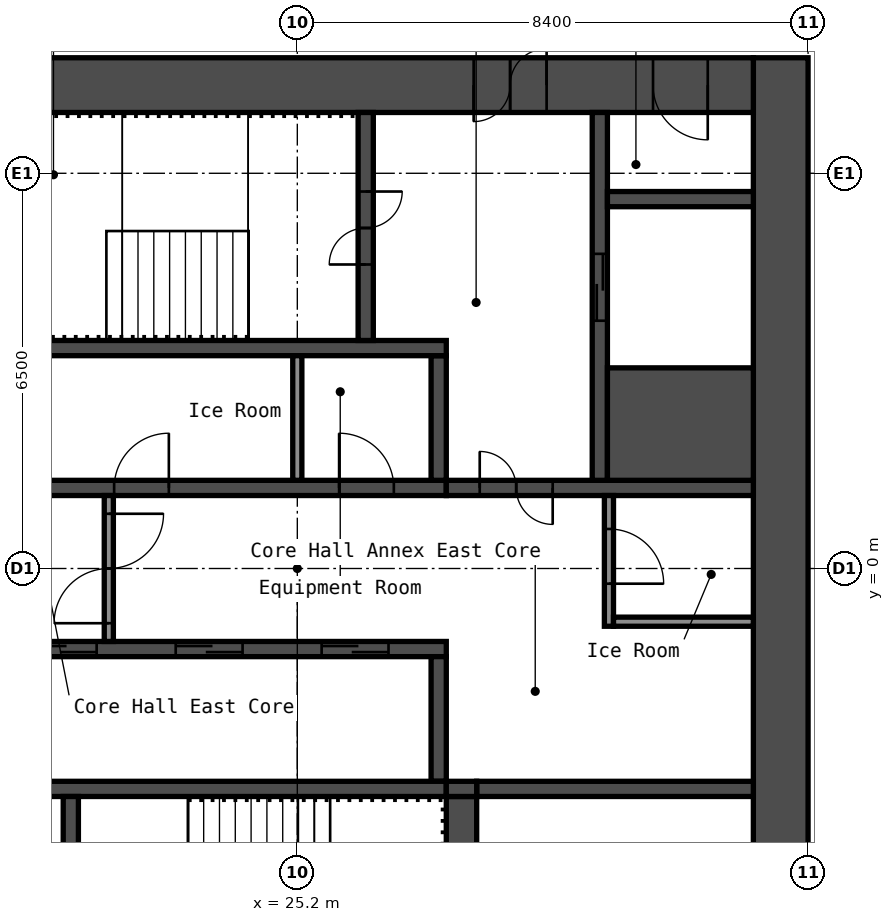
"""IFC4 building model, lengths in metres.
Left out: names, types, materials, properties, quantities, classifications, styles, units other than length and angle.
Written with IfcOpenShell. Run it as: python <this file> out.ifc"""

import sys

from ifc_helpers import new_model, si_unit, direction, frame, frame_2d, origin, place, context, subcontext, project, spatial, rectangle, extrude, element, fill, save


model = new_model("IFC4")
c1 = context("Model", 3, precision=1e-05, world=origin(), true_north=direction((0.0, 1.0)))
c2 = subcontext(c1, "Body", "Model", "MODEL_VIEW")
j1 = project(units=[si_unit("LENGTHUNIT", "METRE"), si_unit("PLANEANGLEUNIT", "RADIAN")], contexts=[c1])
p1 = place(None, origin())
s1 = spatial("IfcSite", under=j1, at=p1, CompositionType="ELEMENT")
p2 = place(p1, origin())
s2 = spatial("IfcBuilding", under=s1, at=p2, CompositionType="ELEMENT")
p3 = place(p2, frame((0.0, 0.0, 239.0)))
s3 = spatial("IfcBuildingStorey", under=s2, at=p3, CompositionType="ELEMENT", Elevation=239.0)
p4 = place(p3, frame((33.15, -8.4, 0.0), z_axis=(0.0, 0.0, 1.0), x_axis=(0.0, 1.0, 0.0)))
e1 = element("IfcWall", 1, at=p4, inside=s3, PredefinedType="SHEAR", context=c2, shape_type="SweptSolid", body=[
    extrude(rectangle(XDim=16.8, YDim=0.9, at=frame_2d((8.4, 0.0))), origin(), (0.0, 0.0, 1.0), 2.75),
])
p5 = place(p3, frame((17.7, 7.95, 0.0), z_axis=(0.0, 0.0, 1.0), x_axis=(1.0, 0.0, 0.0)))
e2 = element("IfcWall", 2, at=p5, inside=s3, PredefinedType="SHEAR", context=c2, shape_type="SweptSolid", body=[
    extrude(rectangle(XDim=15.0, YDim=0.9, at=frame_2d((7.5, 0.0))), origin(), (0.0, 0.0, 1.0), 2.75),
])
p6 = place(p5, frame((10.4, 0.0, 0.0)))
e3 = element("IfcOpeningElement", 3, at=p6, cuts=e2, PredefinedType="OPENING", context=c2, shape_type="SweptSolid", body=[
    extrude(rectangle(XDim=1.2, YDim=2.1, at=frame_2d((0.6, 1.05))), frame((0.0, 0.46, 0.0), z_axis=(0.0, -1.0, 0.0), x_axis=(1.0, 0.0, 0.0)), (0.0, 0.0, 1.0), 0.92),
])
p7 = place(p5, frame((13.35, 0.0, 0.0)))
e4 = element("IfcOpeningElement", 4, at=p7, cuts=e2, PredefinedType="OPENING", context=c2, shape_type="SweptSolid", body=[
    extrude(rectangle(XDim=0.9, YDim=2.1, at=frame_2d((0.45, 1.05))), frame((0.0, 0.46, 0.0), z_axis=(0.0, -1.0, 0.0), x_axis=(1.0, 0.0, 0.0)), (0.0, 0.0, 1.0), 0.92),
])
p8 = place(p3, frame((20.15, 1.325, 0.0), z_axis=(0.0, 0.0, 1.0), x_axis=(1.0, 0.0, 0.0)))
e5 = element("IfcWall", 5, at=p8, inside=s3, PredefinedType="SHEAR", context=c2, shape_type="SweptSolid", body=[
    extrude(rectangle(XDim=7.5, YDim=0.25, at=frame_2d((3.75, 0.0))), origin(), (0.0, 0.0, 1.0), 2.75),
])
p9 = place(p8, frame((2.038, 0.0, 0.0)))
e6 = element("IfcOpeningElement", 6, at=p9, cuts=e5, PredefinedType="OPENING", context=c2, shape_type="SweptSolid", body=[
    extrude(rectangle(XDim=0.9, YDim=2.1, at=frame_2d((0.45, 1.05))), frame((0.0, 0.135, 0.0), z_axis=(0.0, -1.0, 0.0), x_axis=(1.0, 0.0, 0.0)), (0.0, 0.0, 1.0), 0.27),
])
p10 = place(p8, frame((5.738, 0.0, 0.0)))
e7 = element("IfcOpeningElement", 7, at=p10, cuts=e5, PredefinedType="OPENING", context=c2, shape_type="SweptSolid", body=[
    extrude(rectangle(XDim=0.9, YDim=2.1, at=frame_2d((0.45, 1.05))), frame((0.0, 0.135, 0.0), z_axis=(0.0, -1.0, 0.0), x_axis=(1.0, 0.0, 0.0)), (0.0, 0.0, 1.0), 0.27),
])
p11 = place(p3, frame((27.525, 1.45, 0.0), z_axis=(0.0, 0.0, 1.0), x_axis=(0.0, 1.0, 0.0)))
e8 = element("IfcWall", 8, at=p11, inside=s3, PredefinedType="SHEAR", context=c2, shape_type="SweptSolid", body=[
    extrude(rectangle(XDim=2.05, YDim=0.25, at=frame_2d((1.025, 0.0))), origin(), (0.0, 0.0, 1.0), 2.75),
])
p12 = place(p3, frame((20.15, 3.625, 0.0), z_axis=(0.0, 0.0, 1.0), x_axis=(1.0, 0.0, 0.0)))
e9 = element("IfcWall", 9, at=p12, inside=s3, PredefinedType="SHEAR", context=c2, shape_type="SweptSolid", body=[
    extrude(rectangle(XDim=7.5, YDim=0.25, at=frame_2d((3.75, 0.0))), origin(), (0.0, 0.0, 1.0), 2.75),
])
p13 = place(p3, frame((26.325, 3.75, 0.0), z_axis=(0.0, 0.0, 1.0), x_axis=(0.0, 1.0, 0.0)))
e10 = element("IfcWall", 10, at=p13, inside=s3, PredefinedType="SHEAR", context=c2, shape_type="SweptSolid", body=[
    extrude(rectangle(XDim=3.75, YDim=0.25, at=frame_2d((1.875, 0.0))), origin(), (0.0, 0.0, 1.0), 2.75),
])
p14 = place(p13, frame((1.25, 0.0, 0.0)))
e11 = element("IfcOpeningElement", 11, at=p14, cuts=e10, PredefinedType="OPENING", context=c2, shape_type="SweptSolid", body=[
    extrude(rectangle(XDim=1.2, YDim=2.1, at=frame_2d((0.6, 1.05))), frame((0.0, 0.135, 0.0), z_axis=(0.0, -1.0, 0.0), x_axis=(1.0, 0.0, 0.0)), (0.0, 0.0, 1.0), 0.27),
])
p15 = place(p3, frame((27.65, 1.325, 0.0), z_axis=(0.0, 0.0, 1.0), x_axis=(1.0, 0.0, 0.0)))
e12 = element("IfcWall", 12, at=p15, inside=s3, PredefinedType="SHEAR", context=c2, shape_type="SweptSolid", body=[
    extrude(rectangle(XDim=5.05, YDim=0.25, at=frame_2d((2.525, 0.0))), origin(), (0.0, 0.0, 1.0), 2.75),
])
p16 = place(p15, frame((0.55, 0.0, 0.0)))
e13 = element("IfcOpeningElement", 13, at=p16, cuts=e12, PredefinedType="OPENING", context=c2, shape_type="SweptSolid", body=[
    extrude(rectangle(XDim=1.2, YDim=2.1, at=frame_2d((0.6, 1.05))), frame((0.0, 0.135, 0.0), z_axis=(0.0, -1.0, 0.0), x_axis=(1.0, 0.0, 0.0)), (0.0, 0.0, 1.0), 0.27),
])
p17 = place(p3, frame((30.175, 1.45, 0.0), z_axis=(0.0, 0.0, 1.0), x_axis=(0.0, 1.0, 0.0)))
e14 = element("IfcWall", 14, at=p17, inside=s3, PredefinedType="SHEAR", context=c2, shape_type="SweptSolid", body=[
    extrude(rectangle(XDim=6.05, YDim=0.25, at=frame_2d((3.025, 0.0))), origin(), (0.0, 0.0, 1.0), 2.75),
])
p18 = place(p17, frame((2.625, 0.0, 0.0)))
e15 = element("IfcOpeningElement", 15, at=p18, cuts=e14, PredefinedType="OPENING", context=c2, shape_type="SweptSolid", body=[
    extrude(rectangle(XDim=1.1, YDim=2.1, at=frame_2d((0.55, 1.05))), frame((0.0, 0.135, 0.0), z_axis=(0.0, -1.0, 0.0), x_axis=(1.0, 0.0, 0.0)), (0.0, 0.0, 1.0), 0.27),
])
p19 = place(p3, frame((30.3, 2.375, 0.0), z_axis=(0.0, 0.0, 1.0), x_axis=(1.0, 0.0, 0.0)))
e16 = element("IfcWall", 16, at=p19, inside=s3, PredefinedType="SHEAR", context=c2, shape_type="SweptSolid", body=[
    extrude(rectangle(XDim=2.4, YDim=1.85, at=frame_2d((1.2, 0.0))), origin(), (0.0, 0.0, 1.0), 2.75),
])
p20 = place(p3, frame((30.3, 6.075, 0.0), z_axis=(0.0, 0.0, 1.0), x_axis=(1.0, 0.0, 0.0)))
e17 = element("IfcWall", 17, at=p20, inside=s3, PredefinedType="SHEAR", context=c2, shape_type="SweptSolid", body=[
    extrude(rectangle(XDim=2.4, YDim=0.25, at=frame_2d((1.2, 0.0))), origin(), (0.0, 0.0, 1.0), 2.75),
])
p21 = place(p3, frame((20.15, -1.325, 0.0), z_axis=(0.0, 0.0, 1.0), x_axis=(1.0, 0.0, 0.0)))
e18 = element("IfcWall", 18, at=p21, inside=s3, PredefinedType="SHEAR", context=c2, shape_type="SweptSolid", body=[
    extrude(rectangle(XDim=7.5, YDim=0.25, at=frame_2d((3.75, 0.0))), origin(), (0.0, 0.0, 1.0), 2.75),
])
p22 = place(p21, frame((0.65, 0.0, 0.0)))
e19 = element("IfcOpeningElement", 19, at=p22, cuts=e18, PredefinedType="OPENING", context=c2, shape_type="SweptSolid", body=[
    extrude(rectangle(XDim=1.1, YDim=2.1, at=frame_2d((0.55, 1.05))), frame((0.0, 0.135, 0.0), z_axis=(0.0, -1.0, 0.0), x_axis=(1.0, 0.0, 0.0)), (0.0, 0.0, 1.0), 0.27),
])
p23 = place(p21, frame((3.05, 0.0, 0.0)))
e20 = element("IfcOpeningElement", 20, at=p23, cuts=e18, PredefinedType="OPENING", context=c2, shape_type="SweptSolid", body=[
    extrude(rectangle(XDim=1.1, YDim=2.1, at=frame_2d((0.55, 1.05))), frame((0.0, 0.135, 0.0), z_axis=(0.0, -1.0, 0.0), x_axis=(1.0, 0.0, 0.0)), (0.0, 0.0, 1.0), 0.27),
])
p24 = place(p21, frame((5.45, 0.0, 0.0)))
e21 = element("IfcOpeningElement", 21, at=p24, cuts=e18, PredefinedType="OPENING", context=c2, shape_type="SweptSolid", body=[
    extrude(rectangle(XDim=1.1, YDim=2.1, at=frame_2d((0.55, 1.05))), frame((0.0, 0.135, 0.0), z_axis=(0.0, -1.0, 0.0), x_axis=(1.0, 0.0, 0.0)), (0.0, 0.0, 1.0), 0.27),
])
p25 = place(p3, frame((27.525, -3.5, 0.0), z_axis=(0.0, 0.0, 1.0), x_axis=(0.0, 1.0, 0.0)))
e22 = element("IfcWall", 22, at=p25, inside=s3, PredefinedType="SHEAR", context=c2, shape_type="SweptSolid", body=[
    extrude(rectangle(XDim=2.05, YDim=0.25, at=frame_2d((1.025, 0.0))), origin(), (0.0, 0.0, 1.0), 2.75),
])
p26 = place(p3, frame((20.15, -3.625, 0.0), z_axis=(0.0, 0.0, 1.0), x_axis=(1.0, 0.0, 0.0)))
e23 = element("IfcWall", 23, at=p26, inside=s3, PredefinedType="SHEAR", context=c2, shape_type="SweptSolid", body=[
    extrude(rectangle(XDim=7.5, YDim=0.25, at=frame_2d((3.75, 0.0))), origin(), (0.0, 0.0, 1.0), 2.75),
])
p27 = place(p3, frame((21.475, -7.5, 0.0), z_axis=(0.0, 0.0, 1.0), x_axis=(0.0, 1.0, 0.0)))
e24 = element("IfcWall", 24, at=p27, inside=s3, PredefinedType="SHEAR", context=c2, shape_type="SweptSolid", body=[
    extrude(rectangle(XDim=3.75, YDim=0.25, at=frame_2d((1.875, 0.0))), origin(), (0.0, 0.0, 1.0), 2.75),
])
p28 = place(p27, frame((1.3, 0.0, 0.0)))
e25 = element("IfcOpeningElement", 25, at=p28, cuts=e24, PredefinedType="OPENING", context=c2, shape_type="SweptSolid", body=[
    extrude(rectangle(XDim=1.2, YDim=2.1, at=frame_2d((0.6, 1.05))), frame((0.0, 0.135, 0.0), z_axis=(0.0, -1.0, 0.0), x_axis=(1.0, 0.0, 0.0)), (0.0, 0.0, 1.0), 0.27),
])
p29 = place(p3, frame((27.9, -7.5, 0.0), z_axis=(0.0, 0.0, 1.0), x_axis=(0.0, 1.0, 0.0)))
e26 = element("IfcWall", 26, at=p29, inside=s3, PredefinedType="SHEAR", context=c2, shape_type="SweptSolid", body=[
    extrude(rectangle(XDim=3.75, YDim=0.5, at=frame_2d((1.875, 0.0))), origin(), (0.0, 0.0, 1.0), 2.75),
])
p30 = place(p3, frame((28.15, -3.625, 0.0), z_axis=(0.0, 0.0, 1.0), x_axis=(1.0, 0.0, 0.0)))
e27 = element("IfcWall", 27, at=p30, inside=s3, PredefinedType="SHEAR", context=c2, shape_type="SweptSolid", body=[
    extrude(rectangle(XDim=4.55, YDim=0.25, at=frame_2d((2.275, 0.0))), origin(), (0.0, 0.0, 1.0), 2.75),
])
p31 = place(p3, frame((27.65, -3.625, 0.0), z_axis=(0.0, 0.0, 1.0), x_axis=(1.0, 0.0, 0.0)))
e28 = element("IfcWall", 28, at=p31, inside=s3, PredefinedType="SHEAR", context=c2, shape_type="SweptSolid", body=[
    extrude(rectangle(XDim=0.5, YDim=0.25, at=frame_2d((0.25, 0.0))), origin(), (0.0, 0.0, 1.0), 2.75),
])
p32 = place(p3, frame((22.1, -1.2, 0.0), z_axis=(0.0, 0.0, 1.0), x_axis=(0.0, 1.0, 0.0)))
e29 = element("IfcWall", 29, at=p32, inside=s3, PredefinedType="PARTITIONING", context=c2, shape_type="SweptSolid", body=[
    extrude(rectangle(XDim=2.4, YDim=0.15, at=frame_2d((1.2, 0.0))), origin(), (0.0, 0.0, 1.0), 2.75),
])
p33 = place(p32, frame((0.3, 0.0, 0.0)))
e30 = element("IfcOpeningElement", 30, at=p33, cuts=e29, PredefinedType="OPENING", context=c2, shape_type="SweptSolid", body=[
    extrude(rectangle(XDim=1.8, YDim=2.1, at=frame_2d((0.9, 1.05))), frame((0.0, 0.085, 0.0), z_axis=(0.0, -1.0, 0.0), x_axis=(1.0, 0.0, 0.0)), (0.0, 0.0, 1.0), 0.17),
])
p34 = place(p3, frame((30.325, -0.95, 0.0), z_axis=(0.0, 0.0, 1.0), x_axis=(0.0, 1.0, 0.0)))
e31 = element("IfcWall", 31, at=p34, inside=s3, PredefinedType="PARTITIONING", context=c2, shape_type="SweptSolid", body=[
    extrude(rectangle(XDim=2.15, YDim=0.15, at=frame_2d((1.075, 0.0))), origin(), (0.0, 0.0, 1.0), 2.75),
])
p35 = place(p34, frame((0.7, 0.0, 0.0)))
e32 = element("IfcOpeningElement", 32, at=p35, cuts=e31, PredefinedType="OPENING", context=c2, shape_type="SweptSolid", body=[
    extrude(rectangle(XDim=0.9, YDim=2.1, at=frame_2d((0.45, 1.05))), frame((0.0, 0.085, 0.0), z_axis=(0.0, -1.0, 0.0), x_axis=(1.0, 0.0, 0.0)), (0.0, 0.0, 1.0), 0.17),
])
p36 = place(p3, frame((30.4, -0.875, 0.0), z_axis=(0.0, 0.0, 1.0), x_axis=(1.0, 0.0, 0.0)))
e33 = element("IfcWall", 33, at=p36, inside=s3, PredefinedType="PARTITIONING", context=c2, shape_type="SweptSolid", body=[
    extrude(rectangle(XDim=2.3, YDim=0.15, at=frame_2d((1.15, 0.0))), origin(), (0.0, 0.0, 1.0), 2.75),
])
p37 = place(p3, frame((25.2, 1.45, 0.0), z_axis=(0.0, 0.0, 1.0), x_axis=(0.0, 1.0, 0.0)))
e34 = element("IfcWall", 34, at=p37, inside=s3, PredefinedType="PARTITIONING", context=c2, shape_type="SweptSolid", body=[
    extrude(rectangle(XDim=2.05, YDim=0.15, at=frame_2d((1.025, 0.0))), origin(), (0.0, 0.0, 1.0), 2.75),
])
p38 = place(p6, origin())
e35 = element("IfcDoor", 35, at=p38, inside=s3, OperationType="DOUBLE_DOOR_SINGLE_SWING", PredefinedType="DOOR", context=c2, shape_type="SweptSolid", body=[
    extrude(rectangle(XDim=1.2, YDim=2.1, at=frame_2d((0.6, 1.05))), frame((0.0, 0.025, 0.0), z_axis=(0.0, -1.0, 0.0), x_axis=(1.0, 0.0, 0.0)), (0.0, 0.0, 1.0), 0.05),
])
fill(e3, e35)
p39 = place(p7, origin())
e36 = element("IfcDoor", 36, at=p39, inside=s3, OperationType="SINGLE_SWING_RIGHT", PredefinedType="DOOR", context=c2, shape_type="SweptSolid", body=[
    extrude(rectangle(XDim=0.9, YDim=2.1, at=frame_2d((0.45, 1.05))), frame((0.0, 0.025, 0.0), z_axis=(0.0, -1.0, 0.0), x_axis=(1.0, 0.0, 0.0)), (0.0, 0.0, 1.0), 0.05),
])
fill(e4, e36)
p40 = place(p14, origin())
e37 = element("IfcDoor", 37, at=p40, inside=s3, OperationType="DOUBLE_DOOR_SINGLE_SWING", PredefinedType="DOOR", context=c2, shape_type="SweptSolid", body=[
    extrude(rectangle(XDim=1.2, YDim=2.1, at=frame_2d((0.6, 1.05))), frame((0.0, 0.025, 0.0), z_axis=(0.0, -1.0, 0.0), x_axis=(1.0, 0.0, 0.0)), (0.0, 0.0, 1.0), 0.05),
])
fill(e11, e37)
p41 = place(p16, origin())
e38 = element("IfcDoor", 38, at=p41, inside=s3, OperationType="DOUBLE_DOOR_SINGLE_SWING", PredefinedType="DOOR", context=c2, shape_type="SweptSolid", body=[
    extrude(rectangle(XDim=1.2, YDim=2.1, at=frame_2d((0.6, 1.05))), frame((0.0, 0.025, 0.0), z_axis=(0.0, -1.0, 0.0), x_axis=(1.0, 0.0, 0.0)), (0.0, 0.0, 1.0), 0.05),
])
fill(e13, e38)
p42 = place(p33, origin())
e39 = element("IfcDoor", 39, at=p42, inside=s3, OperationType="DOUBLE_DOOR_SINGLE_SWING", PredefinedType="DOOR", context=c2, shape_type="SweptSolid", body=[
    extrude(rectangle(XDim=1.8, YDim=2.1, at=frame_2d((0.9, 1.05))), frame((0.0, 0.025, 0.0), z_axis=(0.0, -1.0, 0.0), x_axis=(1.0, 0.0, 0.0)), (0.0, 0.0, 1.0), 0.05),
])
fill(e30, e39)
p43 = place(p35, origin())
e40 = element("IfcDoor", 40, at=p43, inside=s3, OperationType="SINGLE_SWING_LEFT", PredefinedType="DOOR", context=c2, shape_type="SweptSolid", body=[
    extrude(rectangle(XDim=0.9, YDim=2.1, at=frame_2d((0.45, 1.05))), frame((0.0, 0.025, 0.0), z_axis=(0.0, -1.0, 0.0), x_axis=(1.0, 0.0, 0.0)), (0.0, 0.0, 1.0), 0.05),
])
fill(e32, e40)
p44 = place(p9, origin())
e41 = element("IfcDoor", 41, at=p44, inside=s3, OperationType="SINGLE_SWING_LEFT", PredefinedType="DOOR", context=c2, shape_type="SweptSolid", body=[
    extrude(rectangle(XDim=0.9, YDim=2.1, at=frame_2d((0.45, 1.05))), frame((0.0, 0.025, 0.0), z_axis=(0.0, -1.0, 0.0), x_axis=(1.0, 0.0, 0.0)), (0.0, 0.0, 1.0), 0.05),
])
fill(e6, e41)
p45 = place(p10, origin())
e42 = element("IfcDoor", 42, at=p45, inside=s3, OperationType="SINGLE_SWING_RIGHT", PredefinedType="DOOR", context=c2, shape_type="SweptSolid", body=[
    extrude(rectangle(XDim=0.9, YDim=2.1, at=frame_2d((0.45, 1.05))), frame((0.0, 0.025, 0.0), z_axis=(0.0, -1.0, 0.0), x_axis=(1.0, 0.0, 0.0)), (0.0, 0.0, 1.0), 0.05),
])
fill(e7, e42)
p46 = place(p22, origin())
e43 = element("IfcDoor", 43, at=p46, inside=s3, OperationType="DOUBLE_DOOR_SLIDING", PredefinedType="DOOR", context=c2, shape_type="SweptSolid", body=[
    extrude(rectangle(XDim=1.1, YDim=2.1, at=frame_2d((0.55, 1.05))), frame((0.0, 0.025, 0.0), z_axis=(0.0, -1.0, 0.0), x_axis=(1.0, 0.0, 0.0)), (0.0, 0.0, 1.0), 0.05),
])
fill(e19, e43)
p47 = place(p23, origin())
e44 = element("IfcDoor", 44, at=p47, inside=s3, OperationType="DOUBLE_DOOR_SLIDING", PredefinedType="DOOR", context=c2, shape_type="SweptSolid", body=[
    extrude(rectangle(XDim=1.1, YDim=2.1, at=frame_2d((0.55, 1.05))), frame((0.0, 0.025, 0.0), z_axis=(0.0, -1.0, 0.0), x_axis=(1.0, 0.0, 0.0)), (0.0, 0.0, 1.0), 0.05),
])
fill(e20, e44)
p48 = place(p24, origin())
e45 = element("IfcDoor", 45, at=p48, inside=s3, OperationType="DOUBLE_DOOR_SLIDING", PredefinedType="DOOR", context=c2, shape_type="SweptSolid", body=[
    extrude(rectangle(XDim=1.1, YDim=2.1, at=frame_2d((0.55, 1.05))), frame((0.0, 0.025, 0.0), z_axis=(0.0, -1.0, 0.0), x_axis=(1.0, 0.0, 0.0)), (0.0, 0.0, 1.0), 0.05),
])
fill(e21, e45)
p49 = place(p18, origin())
e46 = element("IfcDoor", 46, at=p49, inside=s3, OperationType="DOUBLE_DOOR_SLIDING", PredefinedType="DOOR", context=c2, shape_type="SweptSolid", body=[
    extrude(rectangle(XDim=1.1, YDim=2.1, at=frame_2d((0.55, 1.05))), frame((0.0, 0.025, 0.0), z_axis=(0.0, -1.0, 0.0), x_axis=(1.0, 0.0, 0.0)), (0.0, 0.0, 1.0), 0.05),
])
fill(e15, e46)
save(model, sys.argv[1])
